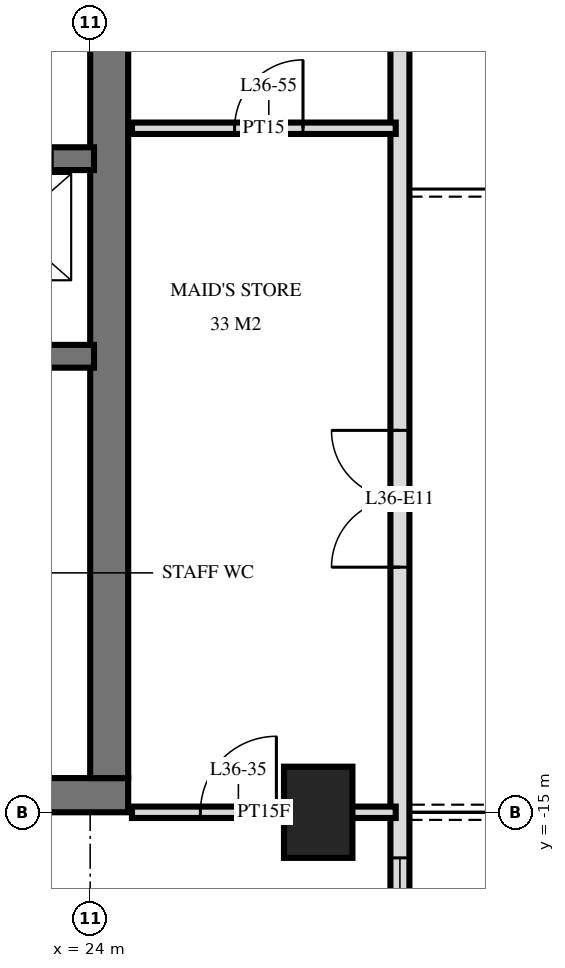
"""IFC4 building model, lengths in metres.
Left out: names, types, materials, properties, quantities, classifications, styles, units other than length and angle.
Written with IfcOpenShell. Run it as: python <this file> out.ifc"""

import sys

from ifc_helpers import new_model, si_unit, direction, frame, frame_2d, origin, origin_2d, place, context, subcontext, project, spatial, rectangle, extrude, element, fill, save


model = new_model("IFC4")
c1 = context("Model", 3, precision=1e-05, world=origin(), true_north=direction((0.0, 1.0)))
c2 = subcontext(c1, "Body", "Model", "MODEL_VIEW")
j1 = project(units=[si_unit("LENGTHUNIT", "METRE"), si_unit("PLANEANGLEUNIT", "RADIAN")], contexts=[c1])
p1 = place(None, origin())
s1 = spatial("IfcSite", under=j1, at=p1, CompositionType="ELEMENT")
p2 = place(p1, origin())
s2 = spatial("IfcBuilding", under=s1, at=p2, CompositionType="ELEMENT")
p3 = place(p2, frame((0.0, 0.0, 141.6)))
s3 = spatial("IfcBuildingStorey", under=s2, at=p3, CompositionType="ELEMENT", Elevation=141.6)
p4 = place(p3, frame((27.0, -15.0, 0.0), z_axis=(0.0, 0.0, 1.0), x_axis=(0.0, 1.0, 0.0)))
e1 = element("IfcColumn", 1, at=p4, inside=s3, PredefinedType="COLUMN", context=c2, shape_type="SweptSolid", body=[
    extrude(rectangle(XDim=1.2, YDim=0.9, at=origin_2d()), origin(), (0.0, 0.0, 1.0), 3.6),
])
p5 = place(p3, frame((10.0, -14.775, 0.0), z_axis=(0.0, 0.0, 1.0), x_axis=(1.0, 0.0, 0.0)))
e2 = element("IfcWall", 2, at=p5, inside=s3, PredefinedType="SHEAR", context=c2, shape_type="SweptSolid", body=[
    extrude(rectangle(XDim=14.5, YDim=0.45, at=frame_2d((7.25, 0.0))), origin(), (0.0, 0.0, 1.0), 3.6),
])
p6 = place(p5, frame((7.1, 0.0, 0.0)))
e3 = element("IfcOpeningElement", 3, at=p6, cuts=e2, PredefinedType="OPENING", context=c2, shape_type="SweptSolid", body=[
    extrude(rectangle(XDim=1.2, YDim=2.1, at=frame_2d((0.6, 1.05))), frame((0.0, 0.235, 0.0), z_axis=(0.0, -1.0, 0.0), x_axis=(1.0, 0.0, 0.0)), (0.0, 0.0, 1.0), 0.47),
])
p7 = place(p5, frame((4.15, 0.0, 0.0)))
e4 = element("IfcOpeningElement", 4, at=p7, cuts=e2, PredefinedType="OPENING", context=c2, shape_type="SweptSolid", body=[
    extrude(rectangle(XDim=1.1, YDim=2.1, at=frame_2d((0.55, 1.05))), frame((0.0, 0.235, 0.0), z_axis=(0.0, -1.0, 0.0), x_axis=(1.0, 0.0, 0.0)), (0.0, 0.0, 1.0), 0.47),
])
p8 = place(p5, frame((10.1, 0.0, 0.0)))
e5 = element("IfcOpeningElement", 5, at=p8, cuts=e2, PredefinedType="OPENING", context=c2, shape_type="SweptSolid", body=[
    extrude(rectangle(XDim=0.9, YDim=2.1, at=frame_2d((0.45, 1.05))), frame((0.0, 0.235, 0.0), z_axis=(0.0, -1.0, 0.0), x_axis=(1.0, 0.0, 0.0)), (0.0, 0.0, 1.0), 0.47),
])
p9 = place(p5, frame((12.45, 0.0, 0.0)))
e6 = element("IfcOpeningElement", 6, at=p9, cuts=e2, PredefinedType="OPENING", context=c2, shape_type="SweptSolid", body=[
    extrude(rectangle(XDim=1.0, YDim=2.1, at=frame_2d((0.5, 1.05))), frame((0.0, 0.235, 0.0), z_axis=(0.0, -1.0, 0.0), x_axis=(1.0, 0.0, 0.0)), (0.0, 0.0, 1.0), 0.47),
])
p10 = place(p3, frame((24.25, -14.55, 0.0), z_axis=(0.0, 0.0, 1.0), x_axis=(0.0, 1.0, 0.0)))
e7 = element("IfcWall", 7, at=p10, inside=s3, PredefinedType="SHEAR", context=c2, shape_type="SweptSolid", body=[
    extrude(rectangle(XDim=14.1, YDim=0.5, at=frame_2d((7.05, 0.0))), origin(), (0.0, 0.0, 1.0), 3.6),
])
p11 = place(p3, frame((10.35, -6.4, 0.0), z_axis=(0.0, 0.0, 1.0), x_axis=(1.0, 0.0, 0.0)))
e8 = element("IfcWall", 8, at=p11, inside=s3, PredefinedType="SHEAR", context=c2, shape_type="SweptSolid", body=[
    extrude(rectangle(XDim=13.7, YDim=0.3, at=frame_2d((6.85, 0.0))), origin(), (0.0, 0.0, 1.0), 3.6),
])
p12 = place(p11, frame((12.05, 0.0, 0.0)))
e9 = element("IfcOpeningElement", 9, at=p12, cuts=e8, PredefinedType="OPENING", context=c2, shape_type="SweptSolid", body=[
    extrude(rectangle(XDim=1.1, YDim=2.1, at=frame_2d((0.55, 1.05))), frame((0.0, 0.16, 0.0), z_axis=(0.0, -1.0, 0.0), x_axis=(1.0, 0.0, 0.0)), (0.0, 0.0, 1.0), 0.32),
])
p13 = place(p11, frame((6.8, 0.0, 0.0)))
e10 = element("IfcOpeningElement", 10, at=p13, cuts=e8, PredefinedType="OPENING", context=c2, shape_type="SweptSolid", body=[
    extrude(rectangle(XDim=1.1, YDim=2.1, at=frame_2d((0.55, 1.05))), frame((0.0, 0.16, 0.0), z_axis=(0.0, -1.0, 0.0), x_axis=(1.0, 0.0, 0.0)), (0.0, 0.0, 1.0), 0.32),
])
p14 = place(p3, frame((10.35, -9.0, 0.0), z_axis=(0.0, 0.0, 1.0), x_axis=(1.0, 0.0, 0.0)))
e11 = element("IfcWall", 11, at=p14, inside=s3, PredefinedType="SHEAR", context=c2, shape_type="SweptSolid", body=[
    extrude(rectangle(XDim=13.7, YDim=0.3, at=frame_2d((6.85, 0.0))), origin(), (0.0, 0.0, 1.0), 3.6),
])
p15 = place(p14, frame((3.8, 0.0, 0.0)))
e12 = element("IfcOpeningElement", 12, at=p15, cuts=e11, PredefinedType="OPENING", context=c2, shape_type="SweptSolid", body=[
    extrude(rectangle(XDim=1.1, YDim=2.1, at=frame_2d((0.55, 1.05))), frame((0.0, 0.16, 0.0), z_axis=(0.0, -1.0, 0.0), x_axis=(1.0, 0.0, 0.0)), (0.0, 0.0, 1.0), 0.32),
])
p16 = place(p3, frame((28.075, -29.275, 0.0), z_axis=(0.0, 0.0, 1.0), x_axis=(0.0, 1.0, 0.0)))
e13 = element("IfcWall", 13, at=p16, inside=s3, PredefinedType="SOLIDWALL", context=c2, shape_type="SweptSolid", body=[
    extrude(rectangle(XDim=25.951, YDim=0.25, at=frame_2d((12.975, 0.0))), origin(), (0.0, 0.0, 1.0), 3.32),
])
p17 = place(p16, frame((0.575, 0.0, 0.0)))
e14 = element("IfcOpeningElement", 14, at=p17, cuts=e13, PredefinedType="OPENING", context=c2, shape_type="SweptSolid", body=[
    extrude(rectangle(XDim=1.8, YDim=2.4, at=frame_2d((0.9, 1.2))), frame((0.0, 0.135, 0.0), z_axis=(0.0, -1.0, 0.0), x_axis=(1.0, 0.0, 0.0)), (0.0, 0.0, 1.0), 0.27),
])
p18 = place(p16, frame((3.325, 0.0, 0.3)))
e15 = element("IfcOpeningElement", 15, at=p18, cuts=e13, PredefinedType="OPENING", context=c2, shape_type="SweptSolid", body=[
    extrude(rectangle(XDim=1.8, YDim=2.1, at=frame_2d((0.9, 1.05))), frame((0.0, 0.135, 0.0), z_axis=(0.0, -1.0, 0.0), x_axis=(1.0, 0.0, 0.0)), (0.0, 0.0, 1.0), 0.27),
])
p19 = place(p16, frame((5.775, 0.0, 0.3)))
e16 = element("IfcOpeningElement", 16, at=p19, cuts=e13, PredefinedType="OPENING", context=c2, shape_type="SweptSolid", body=[
    extrude(rectangle(XDim=2.4, YDim=2.1, at=frame_2d((1.2, 1.05))), frame((0.0, 0.135, 0.0), z_axis=(0.0, -1.0, 0.0), x_axis=(1.0, 0.0, 0.0)), (0.0, 0.0, 1.0), 0.27),
])
p20 = place(p16, frame((9.075, 0.0, 0.0)))
e17 = element("IfcOpeningElement", 17, at=p20, cuts=e13, PredefinedType="OPENING", context=c2, shape_type="SweptSolid", body=[
    extrude(rectangle(XDim=1.8, YDim=2.4, at=frame_2d((0.9, 1.2))), frame((0.0, 0.135, 0.0), z_axis=(0.0, -1.0, 0.0), x_axis=(1.0, 0.0, 0.0)), (0.0, 0.0, 1.0), 0.27),
])
p21 = place(p16, frame((12.475, 0.0, 0.3)))
e18 = element("IfcOpeningElement", 18, at=p21, cuts=e13, PredefinedType="OPENING", context=c2, shape_type="SweptSolid", body=[
    extrude(rectangle(XDim=1.2, YDim=2.1, at=frame_2d((0.6, 1.05))), frame((0.0, 0.135, 0.0), z_axis=(0.0, -1.0, 0.0), x_axis=(1.0, 0.0, 0.0)), (0.0, 0.0, 1.0), 0.27),
])
p22 = place(p16, frame((17.5, 0.0, 0.0)))
e19 = element("IfcOpeningElement", 19, at=p22, cuts=e13, PredefinedType="OPENING", context=c2, shape_type="SweptSolid", body=[
    extrude(rectangle(XDim=1.8, YDim=2.4, at=frame_2d((0.9, 1.2))), frame((0.0, 0.135, 0.0), z_axis=(0.0, -1.0, 0.0), x_axis=(1.0, 0.0, 0.0)), (0.0, 0.0, 1.0), 0.27),
])
p23 = place(p3, frame((24.55, -15.0, 0.0), z_axis=(0.0, 0.0, 1.0), x_axis=(1.0, 0.0, 0.0)))
e20 = element("IfcWall", 20, at=p23, inside=s3, PredefinedType="PARTITIONING", context=c2, shape_type="SweptSolid", body=[
    extrude(rectangle(XDim=3.47, YDim=0.15, at=frame_2d((1.735, 0.0))), origin(), (0.0, 0.0, 1.0), 3.32),
])
p24 = place(p23, frame((0.9, 0.0, 0.0)))
e21 = element("IfcOpeningElement", 21, at=p24, cuts=e20, PredefinedType="OPENING", context=c2, shape_type="SweptSolid", body=[
    extrude(rectangle(XDim=1.0, YDim=2.1, at=frame_2d((0.5, 1.05))), frame((0.0, 0.085, 0.0), z_axis=(0.0, -1.0, 0.0), x_axis=(1.0, 0.0, 0.0)), (0.0, 0.0, 1.0), 0.17),
])
p25 = place(p3, frame((24.55, -6.0, 0.0), z_axis=(0.0, 0.0, 1.0), x_axis=(1.0, 0.0, 0.0)))
e22 = element("IfcWall", 22, at=p25, inside=s3, PredefinedType="PARTITIONING", context=c2, shape_type="SweptSolid", body=[
    extrude(rectangle(XDim=3.47, YDim=0.15, at=frame_2d((1.735, 0.0))), origin(), (0.0, 0.0, 1.0), 3.32),
])
p26 = place(p25, frame((1.35, 0.0, 0.0)))
e23 = element("IfcOpeningElement", 23, at=p26, cuts=e22, PredefinedType="OPENING", context=c2, shape_type="SweptSolid", body=[
    extrude(rectangle(XDim=0.9, YDim=2.1, at=frame_2d((0.45, 1.05))), frame((0.0, 0.085, 0.0), z_axis=(0.0, -1.0, 0.0), x_axis=(1.0, 0.0, 0.0)), (0.0, 0.0, 1.0), 0.17),
])
p27 = place(p21, origin())
e24 = element("IfcWindow", 24, at=p27, inside=s3, PartitioningType="SINGLE_PANEL", PredefinedType="WINDOW", context=c2, shape_type="SweptSolid", body=[
    extrude(rectangle(XDim=1.2, YDim=2.1, at=frame_2d((0.6, 1.05))), frame((0.0, 0.03, 0.0), z_axis=(0.0, -1.0, 0.0), x_axis=(1.0, 0.0, 0.0)), (0.0, 0.0, 1.0), 0.06),
])
fill(e18, e24)
p28 = place(p22, origin())
e25 = element("IfcDoor", 25, at=p28, inside=s3, OperationType="DOUBLE_DOOR_SINGLE_SWING", PredefinedType="DOOR", context=c2, shape_type="SweptSolid", body=[
    extrude(rectangle(XDim=1.8, YDim=2.4, at=frame_2d((0.9, 1.2))), frame((0.0, 0.025, 0.0), z_axis=(0.0, -1.0, 0.0), x_axis=(1.0, 0.0, 0.0)), (0.0, 0.0, 1.0), 0.05),
])
fill(e19, e25)
p29 = place(p12, origin())
e26 = element("IfcDoor", 26, at=p29, inside=s3, OperationType="DOUBLE_DOOR_SLIDING", PredefinedType="USERDEFINED", context=c2, shape_type="SweptSolid", body=[
    extrude(rectangle(XDim=1.1, YDim=2.1, at=frame_2d((0.55, 1.05))), frame((0.0, 0.025, 0.0), z_axis=(0.0, -1.0, 0.0), x_axis=(1.0, 0.0, 0.0)), (0.0, 0.0, 1.0), 0.05),
])
fill(e9, e26)
p30 = place(p24, origin())
e27 = element("IfcDoor", 27, at=p30, inside=s3, OperationType="SINGLE_SWING_LEFT", PredefinedType="DOOR", context=c2, shape_type="SweptSolid", body=[
    extrude(rectangle(XDim=1.0, YDim=2.1, at=frame_2d((0.5, 1.05))), frame((0.0, 0.025, 0.0), z_axis=(0.0, -1.0, 0.0), x_axis=(1.0, 0.0, 0.0)), (0.0, 0.0, 1.0), 0.05),
])
fill(e21, e27)
p31 = place(p26, origin())
e28 = element("IfcDoor", 28, at=p31, inside=s3, OperationType="SINGLE_SWING_LEFT", PredefinedType="DOOR", context=c2, shape_type="SweptSolid", body=[
    extrude(rectangle(XDim=0.9, YDim=2.1, at=frame_2d((0.45, 1.05))), frame((0.0, 0.025, 0.0), z_axis=(0.0, -1.0, 0.0), x_axis=(1.0, 0.0, 0.0)), (0.0, 0.0, 1.0), 0.05),
])
fill(e23, e28)
save(model, sys.argv[1])
